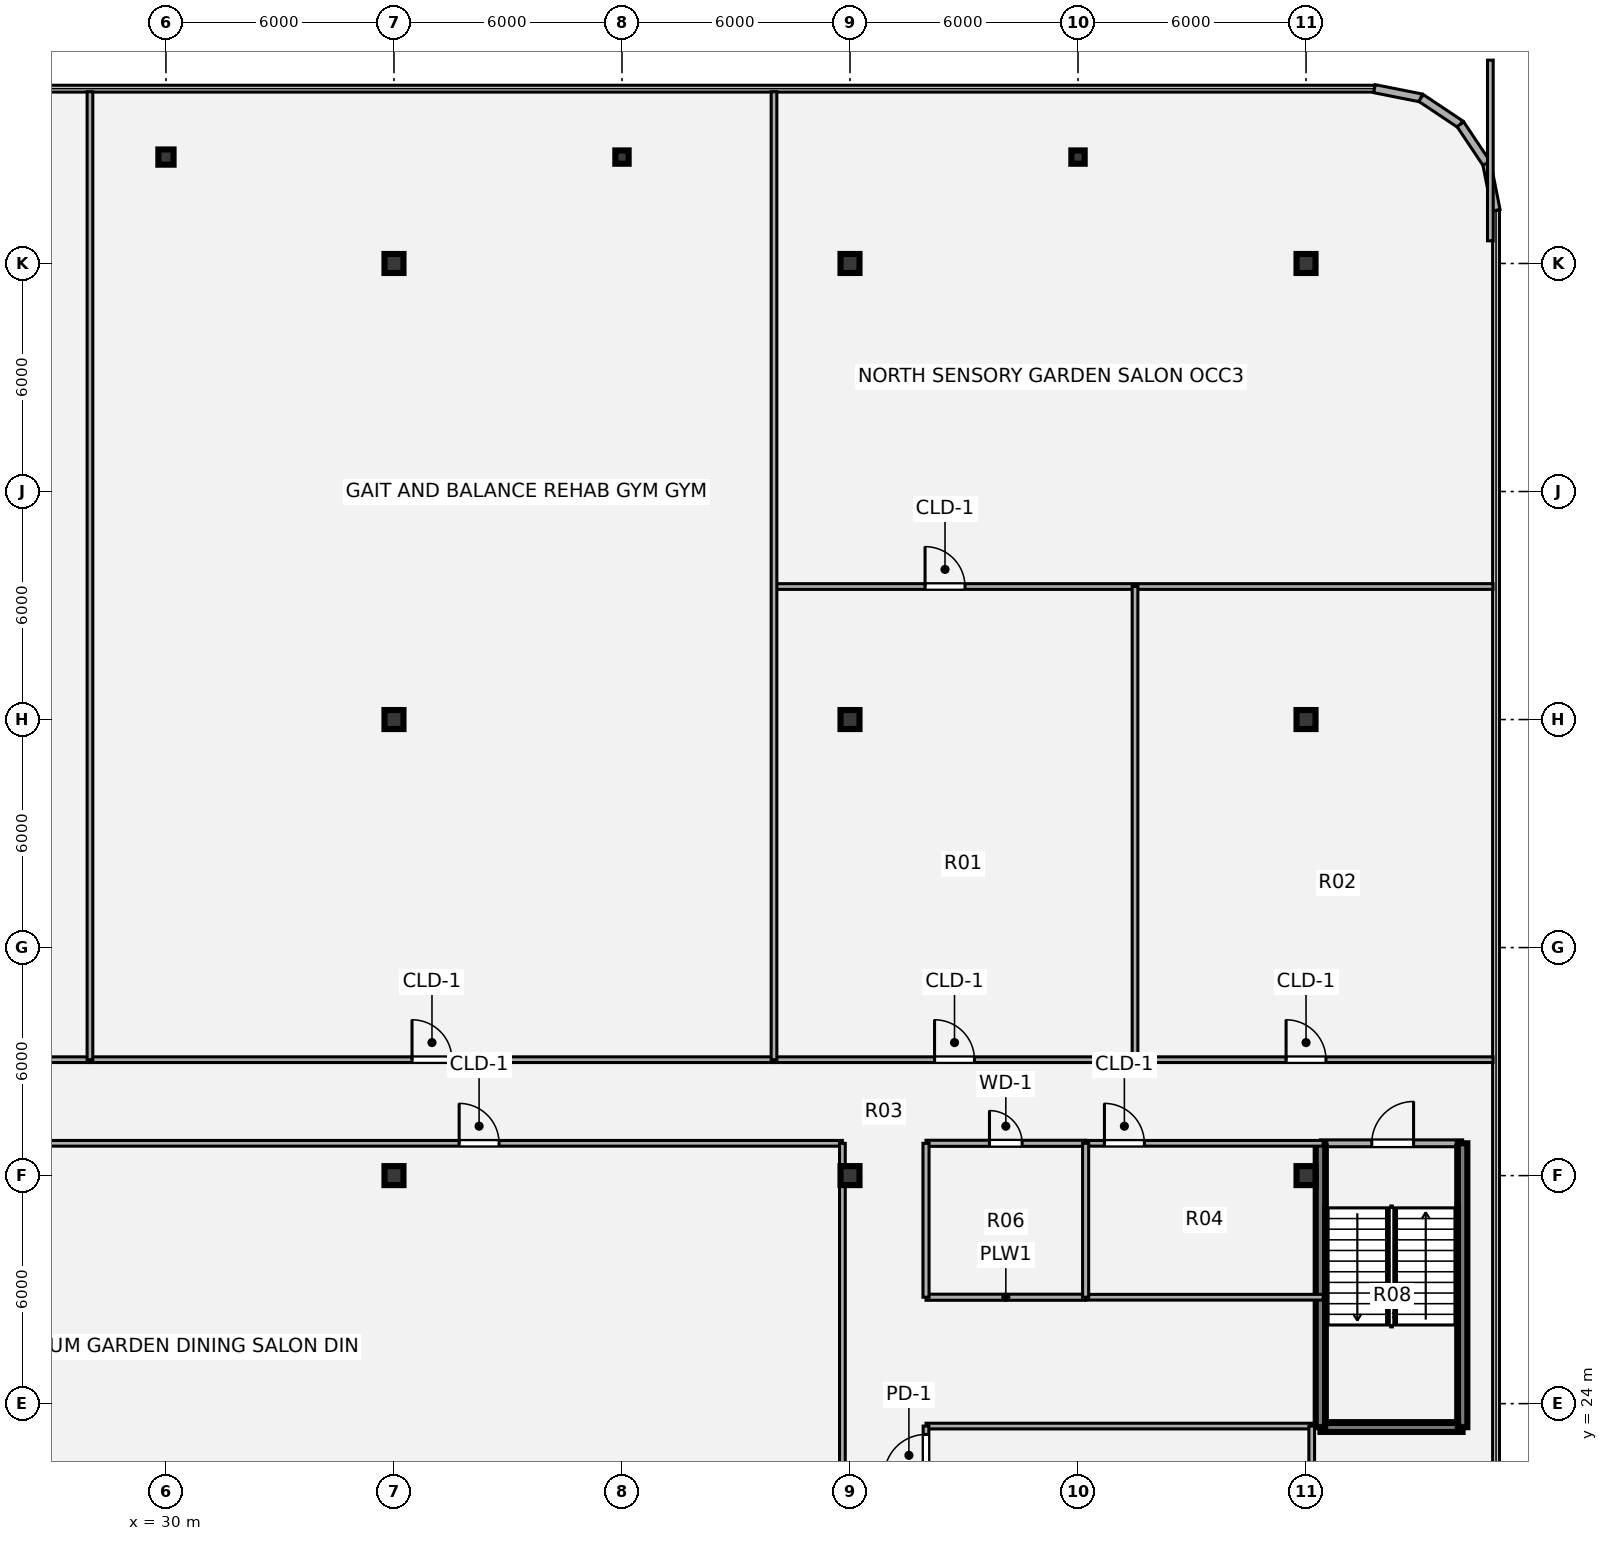
"""IFC4 building model, lengths in metres.
Left out: names, types, materials, properties, quantities, classifications, styles, units other than length and angle.
Written with IfcOpenShell. Run it as: python <this file> out.ifc"""

import sys

from ifc_helpers import new_model, si_unit, direction, frame, frame_2d, origin, origin_2d, place, context, subcontext, project, spatial, rectangle, i_section, extrude, source, transform, mapped, element, fill, save


model = new_model("IFC4")
c1 = context("Model", 3, precision=1e-05, world=origin(), true_north=direction((0.0, 1.0)))
c2 = subcontext(c1, "Body", "Model", "MODEL_VIEW")
j1 = project(units=[si_unit("LENGTHUNIT", "METRE"), si_unit("PLANEANGLEUNIT", "RADIAN")], contexts=[c1])
p1 = place(None, origin())
s1 = spatial("IfcSite", under=j1, at=p1, CompositionType="ELEMENT")
p2 = place(p1, origin())
s2 = spatial("IfcBuilding", under=s1, at=p2, CompositionType="ELEMENT")
p3 = place(p2, frame((0.0, 0.0, 18.36)))
s3 = spatial("IfcBuildingStorey", under=s2, at=p3, CompositionType="ELEMENT", Elevation=18.36)
m1 = source(origin(), c2, "Body", "SweptSolid", [
    extrude(i_section(OverallWidth=0.5, OverallDepth=0.5, WebThickness=0.022, FlangeThickness=0.035, at=origin_2d()), origin(), (0.0, 0.0, 1.0), 4.32),
])
for number, where, z_axis, x_axis in (
    (1, (36.0, 30.0, 0.0), (0.0, 0.0, 1.0), (1.0, 0.0, 0.0)),
    (2, (48.0, 30.0, 0.0), (0.0, 0.0, 1.0), (1.0, 0.0, 0.0)),
    (3, (60.0, 30.0, 0.0), (0.0, 0.0, 1.0), (1.0, 0.0, 0.0)),
    (4, (36.0, 42.0, 0.0), (0.0, 0.0, 1.0), (1.0, 0.0, 0.0)),
    (5, (48.0, 42.0, 0.0), (0.0, 0.0, 1.0), (1.0, 0.0, 0.0)),
    (6, (60.0, 42.0, 0.0), (0.0, 0.0, 1.0), (1.0, 0.0, 0.0)),
    (7, (36.0, 54.0, 0.0), (0.0, 0.0, 1.0), (1.0, 0.0, 0.0)),
    (8, (48.0, 54.0, 0.0), (0.0, 0.0, 1.0), (1.0, 0.0, 0.0)),
    (9, (60.0, 54.0, 0.0), (0.0, 0.0, 1.0), (1.0, 0.0, 0.0)),
):
    element("IfcColumn", number, at=place(p3, frame(where, z_axis=z_axis, x_axis=x_axis)), inside=s3, PredefinedType="COLUMN", context=c2, shape_type="MappedRepresentation", body=[
        mapped(m1, transform((0.0, 0.0, 0.0), x_axis=(1.0, 0.0, 0.0), y_axis=(0.0, 1.0, 0.0), z_axis=(0.0, 0.0, 1.0), scale=1.0)),
    ])
m2 = source(origin(), c2, "Body", "SweptSolid", [
    extrude(i_section(OverallWidth=0.4, OverallDepth=0.4, WebThickness=0.022, FlangeThickness=0.035, at=origin_2d()), origin(), (0.0, 0.0, 1.0), 4.32),
])
p4 = place(p3, frame((30.0, 56.8, 0.0), z_axis=(0.0, 0.0, 1.0), x_axis=(1.0, 0.0, 0.0)))
e10 = element("IfcColumn", 10, at=p4, inside=s3, PredefinedType="COLUMN", context=c2, shape_type="MappedRepresentation", body=[
    mapped(m2, transform((0.0, 0.0, 0.0), x_axis=(1.0, 0.0, 0.0), y_axis=(0.0, 1.0, 0.0), z_axis=(0.0, 0.0, 1.0), scale=1.0)),
])
m3 = source(origin(), c2, "Body", "SweptSolid", [
    extrude(i_section(OverallWidth=0.35, OverallDepth=0.35, WebThickness=0.02, FlangeThickness=0.028, at=origin_2d()), origin(), (0.0, 0.0, 1.0), 4.32),
])
for number, where, z_axis, x_axis in (
    (11, (42.0, 56.8, 0.0), (0.0, 0.0, 1.0), (1.0, 0.0, 0.0)),
    (12, (54.0, 56.8, 0.0), (0.0, 0.0, 1.0), (1.0, 0.0, 0.0)),
):
    element("IfcColumn", number, at=place(p3, frame(where, z_axis=z_axis, x_axis=x_axis)), inside=s3, PredefinedType="COLUMN", context=c2, shape_type="MappedRepresentation", body=[
        mapped(m3, transform((0.0, 0.0, 0.0), x_axis=(1.0, 0.0, 0.0), y_axis=(0.0, 1.0, 0.0), z_axis=(0.0, 0.0, 1.0), scale=1.0)),
    ])
for number, where, z_axis, x_axis in (
    (13, (61.8, 58.6, 0.0), (0.0, 0.0, 1.0), (0.981, -0.195, 0.0)),
    (14, (63.025, 58.356, 0.0), (0.0, 0.0, 1.0), (0.831, -0.556, 0.0)),
    (15, (64.063, 57.663, 0.0), (0.0, 0.0, 1.0), (0.556, -0.831, 0.0)),
    (16, (64.756, 56.625, 0.0), (0.0, 0.0, 1.0), (0.195, -0.981, 0.0)),
):
    element("IfcWall", number, at=place(p3, frame(where, z_axis=z_axis, x_axis=x_axis)), inside=s3, PredefinedType="SOLIDWALL", context=c2, shape_type="SweptSolid", body=[
        extrude(rectangle(XDim=1.249, YDim=0.215, at=frame_2d((0.624, 0.0))), origin(), (0.0, 0.0, 1.0), 4.04),
    ])
p5 = place(p3, frame((60.38, 30.85, 0.0), z_axis=(0.0, 0.0, 1.0), x_axis=(1.0, 0.0, 0.0)))
e17 = element("IfcWall", 17, at=p5, inside=s3, PredefinedType="PARTITIONING", context=c2, shape_type="SweptSolid", body=[
    extrude(rectangle(XDim=3.74, YDim=0.18, at=frame_2d((1.87, 0.0))), origin(), (0.0, 0.0, 1.0), 4.04),
])
p6 = place(p5, frame((1.35, 0.0, 0.0)))
e18 = element("IfcOpeningElement", 18, at=p6, cuts=e17, PredefinedType="OPENING", context=c2, shape_type="SweptSolid", body=[
    extrude(rectangle(XDim=1.1, YDim=2.1, at=origin_2d()), frame((0.55, 0.1, 1.05), z_axis=(0.0, -1.0, 0.0), x_axis=(1.0, 0.0, 0.0)), (0.0, 0.0, 1.0), 0.2),
])
p7 = place(p3, frame((60.38, 23.38, 0.0), z_axis=(0.0, 0.0, 1.0), x_axis=(1.0, 0.0, 0.0)))
e19 = element("IfcWall", 19, at=p7, inside=s3, PredefinedType="SHEAR", context=c2, shape_type="SweptSolid", body=[
    extrude(rectangle(XDim=3.74, YDim=0.25, at=frame_2d((1.87, 0.0))), origin(), (0.0, 0.0, 1.0), 4.32),
])
for number, where, z_axis, x_axis in (
    (20, (60.38, 23.38, 0.0), (0.0, 0.0, 1.0), (0.0, 1.0, 0.0)),
    (21, (64.12, 23.38, 0.0), (0.0, 0.0, 1.0), (0.0, 1.0, 0.0)),
):
    element("IfcWall", number, at=place(p3, frame(where, z_axis=z_axis, x_axis=x_axis)), inside=s3, PredefinedType="SHEAR", context=c2, shape_type="SweptSolid", body=[
        extrude(rectangle(XDim=7.47, YDim=0.25, at=frame_2d((3.735, 0.0))), origin(), (0.0, 0.0, 1.0), 4.32),
    ])
p8 = place(p3, frame((50.0, 23.41, 0.0), z_axis=(0.0, 0.0, 1.0), x_axis=(1.0, 0.0, 0.0)))
e22 = element("IfcWall", 22, at=p8, inside=s3, PredefinedType="PARTITIONING", context=c2, shape_type="SweptSolid", body=[
    extrude(rectangle(XDim=10.15, YDim=0.15, at=frame_2d((5.075, 0.0))), origin(), (0.0, 0.0, 1.0), 4.01),
])
p9 = place(p3, frame((50.0, 26.8, 0.0), z_axis=(0.0, 0.0, 1.0), x_axis=(1.0, 0.0, 0.0)))
e23 = element("IfcWall", 23, at=p9, inside=s3, PredefinedType="PLUMBINGWALL", context=c2, shape_type="SweptSolid", body=[
    extrude(rectangle(XDim=4.2, YDim=0.16, at=frame_2d((2.1, 0.0))), origin(), (0.0, 0.0, 1.0), 4.01),
])
p10 = place(p3, frame((54.2, 26.8, 0.0), z_axis=(0.0, 0.0, 1.0), x_axis=(1.0, 0.0, 0.0)))
e24 = element("IfcWall", 24, at=p10, inside=s3, PredefinedType="PARTITIONING", context=c2, shape_type="SweptSolid", body=[
    extrude(rectangle(XDim=6.25, YDim=0.15, at=frame_2d((3.125, 0.0))), origin(), (0.0, 0.0, 1.0), 4.01),
])
p11 = place(p3, frame((24.2, 30.85, 0.0), z_axis=(0.0, 0.0, 1.0), x_axis=(1.0, 0.0, 0.0)))
e25 = element("IfcWall", 25, at=p11, inside=s3, PredefinedType="PARTITIONING", context=c2, shape_type="SweptSolid", body=[
    extrude(rectangle(XDim=23.6, YDim=0.15, at=frame_2d((11.8, 0.0))), origin(), (0.0, 0.0, 1.0), 4.01),
])
p12 = place(p11, frame((13.515, 0.0, 0.0)))
e26 = element("IfcOpeningElement", 26, at=p12, cuts=e25, PredefinedType="OPENING", context=c2, shape_type="SweptSolid", body=[
    extrude(rectangle(XDim=1.05, YDim=2.1, at=origin_2d()), frame((0.525, 0.085, 1.05), z_axis=(0.0, -1.0, 0.0), x_axis=(1.0, 0.0, 0.0)), (0.0, 0.0, 1.0), 0.17),
])
p13 = place(p3, frame((50.0, 30.85, 0.0), z_axis=(0.0, 0.0, 1.0), x_axis=(1.0, 0.0, 0.0)))
e27 = element("IfcWall", 27, at=p13, inside=s3, PredefinedType="PLUMBINGWALL", context=c2, shape_type="SweptSolid", body=[
    extrude(rectangle(XDim=4.2, YDim=0.16, at=frame_2d((2.1, 0.0))), origin(), (0.0, 0.0, 1.0), 4.01),
])
p14 = place(p13, frame((1.67, 0.0, 0.0)))
e28 = element("IfcOpeningElement", 28, at=p14, cuts=e27, PredefinedType="OPENING", context=c2, shape_type="SweptSolid", body=[
    extrude(rectangle(XDim=0.86, YDim=2.1, at=origin_2d()), frame((0.43, 0.09, 1.05), z_axis=(0.0, -1.0, 0.0), x_axis=(1.0, 0.0, 0.0)), (0.0, 0.0, 1.0), 0.18),
])
p15 = place(p3, frame((54.2, 30.85, 0.0), z_axis=(0.0, 0.0, 1.0), x_axis=(1.0, 0.0, 0.0)))
e29 = element("IfcWall", 29, at=p15, inside=s3, PredefinedType="PARTITIONING", context=c2, shape_type="SweptSolid", body=[
    extrude(rectangle(XDim=6.25, YDim=0.15, at=frame_2d((3.125, 0.0))), origin(), (0.0, 0.0, 1.0), 4.01),
])
p16 = place(p15, frame((0.495, 0.0, 0.0)))
e30 = element("IfcOpeningElement", 30, at=p16, cuts=e29, PredefinedType="OPENING", context=c2, shape_type="SweptSolid", body=[
    extrude(rectangle(XDim=1.05, YDim=2.1, at=origin_2d()), frame((0.525, 0.085, 1.05), z_axis=(0.0, -1.0, 0.0), x_axis=(1.0, 0.0, 0.0)), (0.0, 0.0, 1.0), 0.17),
])
p17 = place(p3, frame((7.08, 33.05, 0.0), z_axis=(0.0, 0.0, 1.0), x_axis=(1.0, 0.0, 0.0)))
e31 = element("IfcWall", 31, at=p17, inside=s3, PredefinedType="PARTITIONING", context=c2, shape_type="SweptSolid", body=[
    extrude(rectangle(XDim=20.92, YDim=0.15, at=frame_2d((10.46, 0.0))), origin(), (0.0, 0.0, 1.0), 4.01),
])
p18 = place(p17, frame((12.395, 0.0, 0.0)))
e32 = element("IfcOpeningElement", 32, at=p18, cuts=e31, PredefinedType="OPENING", context=c2, shape_type="SweptSolid", body=[
    extrude(rectangle(XDim=1.05, YDim=2.1, at=origin_2d()), frame((0.525, 0.085, 1.05), z_axis=(0.0, -1.0, 0.0), x_axis=(1.0, 0.0, 0.0)), (0.0, 0.0, 1.0), 0.17),
])
p19 = place(p3, frame((28.0, 33.05, 0.0), z_axis=(0.0, 0.0, 1.0), x_axis=(1.0, 0.0, 0.0)))
e33 = element("IfcWall", 33, at=p19, inside=s3, PredefinedType="PARTITIONING", context=c2, shape_type="SweptSolid", body=[
    extrude(rectangle(XDim=18.0, YDim=0.15, at=frame_2d((9.0, 0.0))), origin(), (0.0, 0.0, 1.0), 4.01),
])
p20 = place(p19, frame((8.475, 0.0, 0.0)))
e34 = element("IfcOpeningElement", 34, at=p20, cuts=e33, PredefinedType="OPENING", context=c2, shape_type="SweptSolid", body=[
    extrude(rectangle(XDim=1.05, YDim=2.1, at=origin_2d()), frame((0.525, 0.085, 1.05), z_axis=(0.0, -1.0, 0.0), x_axis=(1.0, 0.0, 0.0)), (0.0, 0.0, 1.0), 0.17),
])
p21 = place(p3, frame((46.0, 33.05, 0.0), z_axis=(0.0, 0.0, 1.0), x_axis=(1.0, 0.0, 0.0)))
e35 = element("IfcWall", 35, at=p21, inside=s3, PredefinedType="PARTITIONING", context=c2, shape_type="SweptSolid", body=[
    extrude(rectangle(XDim=9.5, YDim=0.15, at=frame_2d((4.75, 0.0))), origin(), (0.0, 0.0, 1.0), 4.01),
])
p22 = place(p21, frame((4.225, 0.0, 0.0)))
e36 = element("IfcOpeningElement", 36, at=p22, cuts=e35, PredefinedType="OPENING", context=c2, shape_type="SweptSolid", body=[
    extrude(rectangle(XDim=1.05, YDim=2.1, at=origin_2d()), frame((0.525, 0.085, 1.05), z_axis=(0.0, -1.0, 0.0), x_axis=(1.0, 0.0, 0.0)), (0.0, 0.0, 1.0), 0.17),
])
p23 = place(p3, frame((55.5, 33.05, 0.0), z_axis=(0.0, 0.0, 1.0), x_axis=(1.0, 0.0, 0.0)))
e37 = element("IfcWall", 37, at=p23, inside=s3, PredefinedType="PARTITIONING", context=c2, shape_type="SweptSolid", body=[
    extrude(rectangle(XDim=9.42, YDim=0.15, at=frame_2d((4.71, 0.0))), origin(), (0.0, 0.0, 1.0), 4.01),
])
p24 = place(p23, frame((3.975, 0.0, 0.0)))
e38 = element("IfcOpeningElement", 38, at=p24, cuts=e37, PredefinedType="OPENING", context=c2, shape_type="SweptSolid", body=[
    extrude(rectangle(XDim=1.05, YDim=2.1, at=origin_2d()), frame((0.525, 0.085, 1.05), z_axis=(0.0, -1.0, 0.0), x_axis=(1.0, 0.0, 0.0)), (0.0, 0.0, 1.0), 0.17),
])
p25 = place(p3, frame((46.0, 45.5, 0.0), z_axis=(0.0, 0.0, 1.0), x_axis=(1.0, 0.0, 0.0)))
e39 = element("IfcWall", 39, at=p25, inside=s3, PredefinedType="PARTITIONING", context=c2, shape_type="SweptSolid", body=[
    extrude(rectangle(XDim=18.92, YDim=0.15, at=frame_2d((9.46, 0.0))), origin(), (0.0, 0.0, 1.0), 4.01),
])
p26 = place(p25, frame((3.975, 0.0, 0.0)))
e40 = element("IfcOpeningElement", 40, at=p26, cuts=e39, PredefinedType="OPENING", context=c2, shape_type="SweptSolid", body=[
    extrude(rectangle(XDim=1.05, YDim=2.1, at=origin_2d()), frame((0.525, 0.085, 1.05), z_axis=(0.0, -1.0, 0.0), x_axis=(1.0, 0.0, 0.0)), (0.0, 0.0, 1.0), 0.17),
])
for number, where, z_axis, x_axis in (
    (41, (28.0, 33.05, 0.0), (0.0, 0.0, 1.0), (0.0, 1.0, 0.0)),
    (42, (46.0, 33.05, 0.0), (0.0, 0.0, 1.0), (0.0, 1.0, 0.0)),
):
    element("IfcWall", number, at=place(p3, frame(where, z_axis=z_axis, x_axis=x_axis)), inside=s3, PredefinedType="PARTITIONING", context=c2, shape_type="SweptSolid", body=[
        extrude(rectangle(XDim=25.47, YDim=0.15, at=frame_2d((12.735, 0.0))), origin(), (0.0, 0.0, 1.0), 3.666),
    ])
p27 = place(p3, frame((47.8, 20.22, 0.0), z_axis=(0.0, 0.0, 1.0), x_axis=(0.0, 1.0, 0.0)))
e43 = element("IfcWall", 43, at=p27, inside=s3, PredefinedType="PARTITIONING", context=c2, shape_type="SweptSolid", body=[
    extrude(rectangle(XDim=10.63, YDim=0.15, at=frame_2d((5.315, 0.0))), origin(), (0.0, 0.0, 1.0), 2.225),
])
p28 = place(p3, frame((50.0, 6.2, 0.0), z_axis=(0.0, 0.0, 1.0), x_axis=(0.0, 1.0, 0.0)))
e44 = element("IfcWall", 44, at=p28, inside=s3, PredefinedType="PARTITIONING", context=c2, shape_type="SweptSolid", body=[
    extrude(rectangle(XDim=17.21, YDim=0.15, at=frame_2d((8.605, 0.0))), origin(), (0.0, 0.0, 1.0), 3.718),
])
p29 = place(p28, frame((15.89, 0.0, 0.0)))
e45 = element("IfcOpeningElement", 45, at=p29, cuts=e44, PredefinedType="OPENING", context=c2, shape_type="SweptSolid", body=[
    extrude(rectangle(XDim=1.1, YDim=2.1, at=origin_2d()), frame((0.55, 0.085, 1.05), z_axis=(0.0, -1.0, 0.0), x_axis=(1.0, 0.0, 0.0)), (0.0, 0.0, 1.0), 0.17),
])
for number, where, z_axis, x_axis in (
    (46, (50.0, 26.8, 0.0), (0.0, 0.0, 1.0), (0.0, 1.0, 0.0)),
    (47, (54.2, 26.8, 0.0), (0.0, 0.0, 1.0), (0.0, 1.0, 0.0)),
):
    element("IfcWall", number, at=place(p3, frame(where, z_axis=z_axis, x_axis=x_axis)), inside=s3, PredefinedType="PLUMBINGWALL", context=c2, shape_type="SweptSolid", body=[
        extrude(rectangle(XDim=4.05, YDim=0.16, at=frame_2d((2.025, 0.0))), origin(), (0.0, 0.0, 1.0), 3.666),
    ])
p30 = place(p3, frame((55.5, 33.05, 0.0), z_axis=(0.0, 0.0, 1.0), x_axis=(0.0, 1.0, 0.0)))
e48 = element("IfcWall", 48, at=p30, inside=s3, PredefinedType="PARTITIONING", context=c2, shape_type="SweptSolid", body=[
    extrude(rectangle(XDim=12.45, YDim=0.15, at=frame_2d((6.225, 0.0))), origin(), (0.0, 0.0, 1.0), 3.666),
])
p31 = place(p3, frame((60.15, 6.2, 0.0), z_axis=(0.0, 0.0, 1.0), x_axis=(0.0, 1.0, 0.0)))
e49 = element("IfcWall", 49, at=p31, inside=s3, PredefinedType="PARTITIONING", context=c2, shape_type="SweptSolid", body=[
    extrude(rectangle(XDim=17.21, YDim=0.15, at=frame_2d((8.605, 0.0))), origin(), (0.0, 0.0, 1.0), 2.225),
])
p32 = place(p3, frame((64.85, 54.596, 0.0), z_axis=(0.0, 0.0, 1.0), x_axis=(0.0, 1.0, 0.0)))
e50 = element("IfcWall", 50, at=p32, inside=s3, PredefinedType="PARTITIONING", context=c2, shape_type="SweptSolid", body=[
    extrude(rectangle(XDim=4.754, YDim=0.15, at=frame_2d((2.377, 0.0))), origin(), (0.0, 0.0, 1.0), 4.01),
])
m4 = source(origin(), c2, "Body", "SweptSolid", [
    extrude(rectangle(XDim=1.1, YDim=2.1, at=origin_2d()), frame((0.55, 0.025, 1.05), z_axis=(0.0, -1.0, 0.0), x_axis=(1.0, 0.0, 0.0)), (0.0, 0.0, 1.0), 0.05),
])
p33 = place(p6, origin())
e51 = element("IfcDoor", 51, at=p33, inside=s3, OperationType="SINGLE_SWING_RIGHT", PredefinedType="DOOR", context=c2, shape_type="MappedRepresentation", body=[
    mapped(m4, transform((0.0, 0.0, 0.0), x_axis=(1.0, 0.0, 0.0), y_axis=(0.0, 1.0, 0.0), z_axis=(0.0, 0.0, 1.0), scale=1.0)),
])
fill(e18, e51)
m5 = source(origin(), c2, "Body", "SweptSolid", [
    extrude(rectangle(XDim=1.05, YDim=2.1, at=origin_2d()), frame((0.525, 0.025, 1.05), z_axis=(0.0, -1.0, 0.0), x_axis=(1.0, 0.0, 0.0)), (0.0, 0.0, 1.0), 0.05),
])
p34 = place(p12, origin())
e52 = element("IfcDoor", 52, at=p34, inside=s3, OperationType="SINGLE_SWING_LEFT", PredefinedType="DOOR", context=c2, shape_type="MappedRepresentation", body=[
    mapped(m5, transform((0.0, 0.0, 0.0), x_axis=(1.0, 0.0, 0.0), y_axis=(0.0, 1.0, 0.0), z_axis=(0.0, 0.0, 1.0), scale=1.0)),
])
fill(e26, e52)
m6 = source(origin(), c2, "Body", "SweptSolid", [
    extrude(rectangle(XDim=0.86, YDim=2.1, at=origin_2d()), frame((0.43, 0.025, 1.05), z_axis=(0.0, -1.0, 0.0), x_axis=(1.0, 0.0, 0.0)), (0.0, 0.0, 1.0), 0.05),
])
p35 = place(p14, origin())
e53 = element("IfcDoor", 53, at=p35, inside=s3, OperationType="SINGLE_SWING_LEFT", PredefinedType="DOOR", context=c2, shape_type="MappedRepresentation", body=[
    mapped(m6, transform((0.0, 0.0, 0.0), x_axis=(1.0, 0.0, 0.0), y_axis=(0.0, 1.0, 0.0), z_axis=(0.0, 0.0, 1.0), scale=1.0)),
])
fill(e28, e53)
p36 = place(p16, origin())
e54 = element("IfcDoor", 54, at=p36, inside=s3, OperationType="SINGLE_SWING_LEFT", PredefinedType="DOOR", context=c2, shape_type="MappedRepresentation", body=[
    mapped(m5, transform((0.0, 0.0, 0.0), x_axis=(1.0, 0.0, 0.0), y_axis=(0.0, 1.0, 0.0), z_axis=(0.0, 0.0, 1.0), scale=1.0)),
])
fill(e30, e54)
p37 = place(p20, origin())
e55 = element("IfcDoor", 55, at=p37, inside=s3, OperationType="SINGLE_SWING_LEFT", PredefinedType="DOOR", context=c2, shape_type="MappedRepresentation", body=[
    mapped(m5, transform((0.0, 0.0, 0.0), x_axis=(1.0, 0.0, 0.0), y_axis=(0.0, 1.0, 0.0), z_axis=(0.0, 0.0, 1.0), scale=1.0)),
])
fill(e34, e55)
p38 = place(p22, origin())
e56 = element("IfcDoor", 56, at=p38, inside=s3, OperationType="SINGLE_SWING_LEFT", PredefinedType="DOOR", context=c2, shape_type="MappedRepresentation", body=[
    mapped(m5, transform((0.0, 0.0, 0.0), x_axis=(1.0, 0.0, 0.0), y_axis=(0.0, 1.0, 0.0), z_axis=(0.0, 0.0, 1.0), scale=1.0)),
])
fill(e36, e56)
p39 = place(p24, origin())
e57 = element("IfcDoor", 57, at=p39, inside=s3, OperationType="SINGLE_SWING_LEFT", PredefinedType="DOOR", context=c2, shape_type="MappedRepresentation", body=[
    mapped(m5, transform((0.0, 0.0, 0.0), x_axis=(1.0, 0.0, 0.0), y_axis=(0.0, 1.0, 0.0), z_axis=(0.0, 0.0, 1.0), scale=1.0)),
])
fill(e38, e57)
p40 = place(p26, origin())
e58 = element("IfcDoor", 58, at=p40, inside=s3, OperationType="SINGLE_SWING_LEFT", PredefinedType="DOOR", context=c2, shape_type="MappedRepresentation", body=[
    mapped(m5, transform((0.0, 0.0, 0.0), x_axis=(1.0, 0.0, 0.0), y_axis=(0.0, 1.0, 0.0), z_axis=(0.0, 0.0, 1.0), scale=1.0)),
])
fill(e40, e58)
m7 = source(origin(), c2, "Body", "SweptSolid", [
    extrude(rectangle(XDim=1.1, YDim=2.1, at=origin_2d()), frame((0.55, 0.025, 1.05), z_axis=(0.0, -1.0, 0.0), x_axis=(1.0, 0.0, 0.0)), (0.0, 0.0, 1.0), 0.05),
])
p41 = place(p29, origin())
e59 = element("IfcDoor", 59, at=p41, inside=s3, OperationType="SINGLE_SWING_LEFT", PredefinedType="DOOR", context=c2, shape_type="MappedRepresentation", body=[
    mapped(m7, transform((0.0, 0.0, 0.0), x_axis=(1.0, 0.0, 0.0), y_axis=(0.0, 1.0, 0.0), z_axis=(0.0, 0.0, 1.0), scale=1.0)),
])
fill(e45, e59)
save(model, sys.argv[1])
